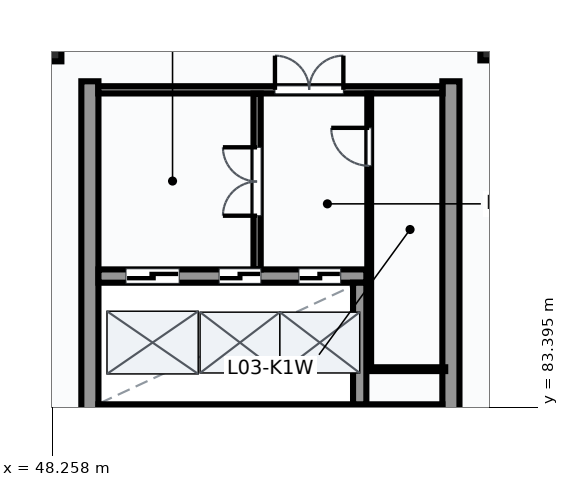
"""IFC4 building model, lengths in metres.
Left out: names, types, materials, properties, quantities, classifications, styles, units other than length and angle.
Written with IfcOpenShell. Run it as: python <this file> out.ifc"""

import sys

from ifc_helpers import new_model, si_unit, direction, frame, frame_2d, origin, origin_2d, place, context, subcontext, project, spatial, rectangle, extrude, element, fill, save


model = new_model("IFC4")
c1 = context("Model", 3, precision=1e-05, world=origin(), true_north=direction((0.0, 1.0)))
c2 = subcontext(c1, "Body", "Model", "MODEL_VIEW")
j1 = project(units=[si_unit("LENGTHUNIT", "METRE"), si_unit("PLANEANGLEUNIT", "RADIAN")], contexts=[c1])
p1 = place(None, origin())
s1 = spatial("IfcSite", under=j1, at=p1, CompositionType="ELEMENT")
p2 = place(p1, origin())
s2 = spatial("IfcBuilding", under=s1, at=p2, CompositionType="ELEMENT")
p3 = place(p2, frame((0.0, 0.0, 14.7)))
s3 = spatial("IfcBuildingStorey", under=s2, at=p3, CompositionType="ELEMENT", Elevation=14.7)
p4 = place(p3, frame((48.0, 93.0, 0.0), z_axis=(0.0, 0.0, 1.0), x_axis=(1.0, 0.0, 0.0)))
e1 = element("IfcColumn", 1, at=p4, inside=s3, PredefinedType="COLUMN", context=c2, shape_type="SweptSolid", body=[
    extrude(rectangle(XDim=1.0, YDim=1.0, at=origin_2d()), origin(), (0.0, 0.0, 1.0), 4.5),
])
p5 = place(p3, frame((60.0, 93.0, 0.0), z_axis=(0.0, 0.0, 1.0), x_axis=(1.0, 0.0, 0.0)))
e2 = element("IfcColumn", 2, at=p5, inside=s3, PredefinedType="COLUMN", context=c2, shape_type="SweptSolid", body=[
    extrude(rectangle(XDim=0.95, YDim=0.95, at=origin_2d()), origin(), (0.0, 0.0, 1.0), 4.5),
])
for number, where, z_axis, x_axis in (
    (3, (49.25, 83.025, 0.0), (0.0, 0.0, 1.0), (0.0, 1.0, 0.0)),
    (4, (58.75, 83.025, 0.0), (0.0, 0.0, 1.0), (0.0, 1.0, 0.0)),
):
    element("IfcWall", number, at=place(p3, frame(where, z_axis=z_axis, x_axis=x_axis)), inside=s3, PredefinedType="SHEAR", context=c2, shape_type="SweptSolid", body=[
        extrude(rectangle(XDim=8.95, YDim=0.45, at=frame_2d((4.475, 0.0))), origin(), (0.0, 0.0, 1.0), 4.5),
    ])
p6 = place(p3, frame((49.475, 83.25, 0.0), z_axis=(0.0, 0.0, 1.0), x_axis=(1.0, 0.0, 0.0)))
e5 = element("IfcWall", 5, at=p6, inside=s3, PredefinedType="SHEAR", context=c2, shape_type="SweptSolid", body=[
    extrude(rectangle(XDim=9.05, YDim=0.45, at=frame_2d((4.525, 0.0))), origin(), (0.0, 0.0, 1.0), 4.5),
])
p7 = place(p3, frame((49.475, 86.85, 0.0), z_axis=(0.0, 0.0, 1.0), x_axis=(1.0, 0.0, 0.0)))
e6 = element("IfcWall", 6, at=p7, inside=s3, PredefinedType="SHEAR", context=c2, shape_type="SweptSolid", body=[
    extrude(rectangle(XDim=7.05, YDim=0.35, at=frame_2d((3.525, 0.0))), origin(), (0.0, 0.0, 1.0), 4.5),
])
p8 = place(p7, frame((0.725, 0.0, 0.0)))
e7 = element("IfcOpeningElement", 7, at=p8, cuts=e6, PredefinedType="OPENING", context=c2, shape_type="SweptSolid", body=[
    extrude(rectangle(XDim=1.4, YDim=2.3, at=frame_2d((0.7, 1.15))), frame((0.0, 0.185, 0.0), z_axis=(0.0, -1.0, 0.0), x_axis=(1.0, 0.0, 0.0)), (0.0, 0.0, 1.0), 0.37),
])
p9 = place(p7, frame((3.175, 0.0, 0.0)))
e8 = element("IfcOpeningElement", 8, at=p9, cuts=e6, PredefinedType="OPENING", context=c2, shape_type="SweptSolid", body=[
    extrude(rectangle(XDim=1.1, YDim=2.2, at=frame_2d((0.55, 1.1))), frame((0.0, 0.185, 0.0), z_axis=(0.0, -1.0, 0.0), x_axis=(1.0, 0.0, 0.0)), (0.0, 0.0, 1.0), 0.37),
])
p10 = place(p7, frame((5.275, 0.0, 0.0)))
e9 = element("IfcOpeningElement", 9, at=p10, cuts=e6, PredefinedType="OPENING", context=c2, shape_type="SweptSolid", body=[
    extrude(rectangle(XDim=1.1, YDim=2.2, at=frame_2d((0.55, 1.1))), frame((0.0, 0.185, 0.0), z_axis=(0.0, -1.0, 0.0), x_axis=(1.0, 0.0, 0.0)), (0.0, 0.0, 1.0), 0.37),
])
p11 = place(p3, frame((56.35, 83.475, 0.0), z_axis=(0.0, 0.0, 1.0), x_axis=(0.0, 1.0, 0.0)))
e10 = element("IfcWall", 10, at=p11, inside=s3, PredefinedType="SHEAR", context=c2, shape_type="SweptSolid", body=[
    extrude(rectangle(XDim=3.2, YDim=0.35, at=frame_2d((1.6, 0.0))), origin(), (0.0, 0.0, 1.0), 4.5),
])
p12 = place(p3, frame((49.47, 91.75, 0.0), z_axis=(0.0, 0.0, 1.0), x_axis=(1.0, 0.0, 0.0)))
e11 = element("IfcWall", 11, at=p12, inside=s3, PredefinedType="PARTITIONING", context=c2, shape_type="SweptSolid", body=[
    extrude(rectangle(XDim=9.06, YDim=0.19, at=frame_2d((4.53, 0.0))), origin(), (0.0, 0.0, 1.0), 4.16),
])
p13 = place(p12, frame((4.65, 0.0, 0.0)))
e12 = element("IfcOpeningElement", 12, at=p13, cuts=e11, PredefinedType="OPENING", context=c2, shape_type="SweptSolid", body=[
    extrude(rectangle(XDim=1.8, YDim=2.3, at=frame_2d((0.9, 1.15))), frame((0.0, 0.105, 0.0), z_axis=(0.0, -1.0, 0.0), x_axis=(1.0, 0.0, 0.0)), (0.0, 0.0, 1.0), 0.21),
])
p14 = place(p3, frame((53.65, 87.025, 0.0), z_axis=(0.0, 0.0, 1.0), x_axis=(0.0, 1.0, 0.0)))
e13 = element("IfcWall", 13, at=p14, inside=s3, PredefinedType="PARTITIONING", context=c2, shape_type="SweptSolid", body=[
    extrude(rectangle(XDim=4.625, YDim=0.19, at=frame_2d((2.312, 0.0))), origin(), (0.0, 0.0, 1.0), 4.16),
])
p15 = place(p14, frame((1.413, 0.0, 0.0)))
e14 = element("IfcOpeningElement", 14, at=p15, cuts=e13, PredefinedType="OPENING", context=c2, shape_type="SweptSolid", body=[
    extrude(rectangle(XDim=1.8, YDim=2.2, at=frame_2d((0.9, 1.1))), frame((0.0, 0.105, 0.0), z_axis=(0.0, -1.0, 0.0), x_axis=(1.0, 0.0, 0.0)), (0.0, 0.0, 1.0), 0.21),
])
p16 = place(p3, frame((56.6, 84.4, 0.0), z_axis=(0.0, 0.0, 1.0), x_axis=(0.0, 1.0, 0.0)))
e15 = element("IfcWall", 15, at=p16, inside=s3, PredefinedType="PARTITIONING", context=c2, shape_type="SweptSolid", body=[
    extrude(rectangle(XDim=7.25, YDim=0.1, at=frame_2d((3.625, 0.0))), origin(), (0.0, 0.0, 1.0), 4.16),
])
p17 = place(p16, frame((5.35, 0.0, 0.0)))
e16 = element("IfcOpeningElement", 16, at=p17, cuts=e15, PredefinedType="OPENING", context=c2, shape_type="SweptSolid", body=[
    extrude(rectangle(XDim=1.0, YDim=2.1, at=frame_2d((0.5, 1.05))), frame((0.0, 0.06, 0.0), z_axis=(0.0, -1.0, 0.0), x_axis=(1.0, 0.0, 0.0)), (0.0, 0.0, 1.0), 0.12),
])
p18 = place(p3, frame((56.6, 84.4, 0.0), z_axis=(0.0, 0.0, 1.0), x_axis=(1.0, 0.0, 0.0)))
e17 = element("IfcWall", 17, at=p18, inside=s3, PredefinedType="PARTITIONING", context=c2, shape_type="SweptSolid", body=[
    extrude(rectangle(XDim=2.0, YDim=0.1, at=frame_2d((1.0, 0.0))), origin(), (0.0, 0.0, 1.0), 4.16),
])
p19 = place(p8, origin())
e18 = element("IfcDoor", 18, at=p19, inside=s3, OperationType="SLIDING_TO_LEFT", PredefinedType="DOOR", context=c2, shape_type="SweptSolid", body=[
    extrude(rectangle(XDim=1.4, YDim=2.3, at=frame_2d((0.7, 1.15))), frame((0.0, 0.025, 0.0), z_axis=(0.0, -1.0, 0.0), x_axis=(1.0, 0.0, 0.0)), (0.0, 0.0, 1.0), 0.05),
])
fill(e7, e18)
p20 = place(p9, origin())
e19 = element("IfcDoor", 19, at=p20, inside=s3, OperationType="SLIDING_TO_LEFT", PredefinedType="DOOR", context=c2, shape_type="SweptSolid", body=[
    extrude(rectangle(XDim=1.1, YDim=2.2, at=frame_2d((0.55, 1.1))), frame((0.0, 0.025, 0.0), z_axis=(0.0, -1.0, 0.0), x_axis=(1.0, 0.0, 0.0)), (0.0, 0.0, 1.0), 0.05),
])
fill(e8, e19)
p21 = place(p10, origin())
e20 = element("IfcDoor", 20, at=p21, inside=s3, OperationType="SLIDING_TO_LEFT", PredefinedType="DOOR", context=c2, shape_type="SweptSolid", body=[
    extrude(rectangle(XDim=1.1, YDim=2.2, at=frame_2d((0.55, 1.1))), frame((0.0, 0.025, 0.0), z_axis=(0.0, -1.0, 0.0), x_axis=(1.0, 0.0, 0.0)), (0.0, 0.0, 1.0), 0.05),
])
fill(e9, e20)
p22 = place(p13, origin())
e21 = element("IfcDoor", 21, at=p22, inside=s3, OperationType="DOUBLE_DOOR_SINGLE_SWING", PredefinedType="DOOR", context=c2, shape_type="SweptSolid", body=[
    extrude(rectangle(XDim=1.8, YDim=2.3, at=frame_2d((0.9, 1.15))), frame((0.0, 0.025, 0.0), z_axis=(0.0, -1.0, 0.0), x_axis=(1.0, 0.0, 0.0)), (0.0, 0.0, 1.0), 0.05),
])
fill(e12, e21)
p23 = place(p15, origin())
e22 = element("IfcDoor", 22, at=p23, inside=s3, OperationType="DOUBLE_DOOR_SINGLE_SWING", PredefinedType="DOOR", context=c2, shape_type="SweptSolid", body=[
    extrude(rectangle(XDim=1.8, YDim=2.2, at=frame_2d((0.9, 1.1))), frame((0.0, 0.025, 0.0), z_axis=(0.0, -1.0, 0.0), x_axis=(1.0, 0.0, 0.0)), (0.0, 0.0, 1.0), 0.05),
])
fill(e14, e22)
p24 = place(p17, origin())
e23 = element("IfcDoor", 23, at=p24, inside=s3, OperationType="SINGLE_SWING_RIGHT", PredefinedType="DOOR", context=c2, shape_type="SweptSolid", body=[
    extrude(rectangle(XDim=1.0, YDim=2.1, at=frame_2d((0.5, 1.05))), frame((0.0, 0.025, 0.0), z_axis=(0.0, -1.0, 0.0), x_axis=(1.0, 0.0, 0.0)), (0.0, 0.0, 1.0), 0.05),
])
fill(e16, e23)
save(model, sys.argv[1])
